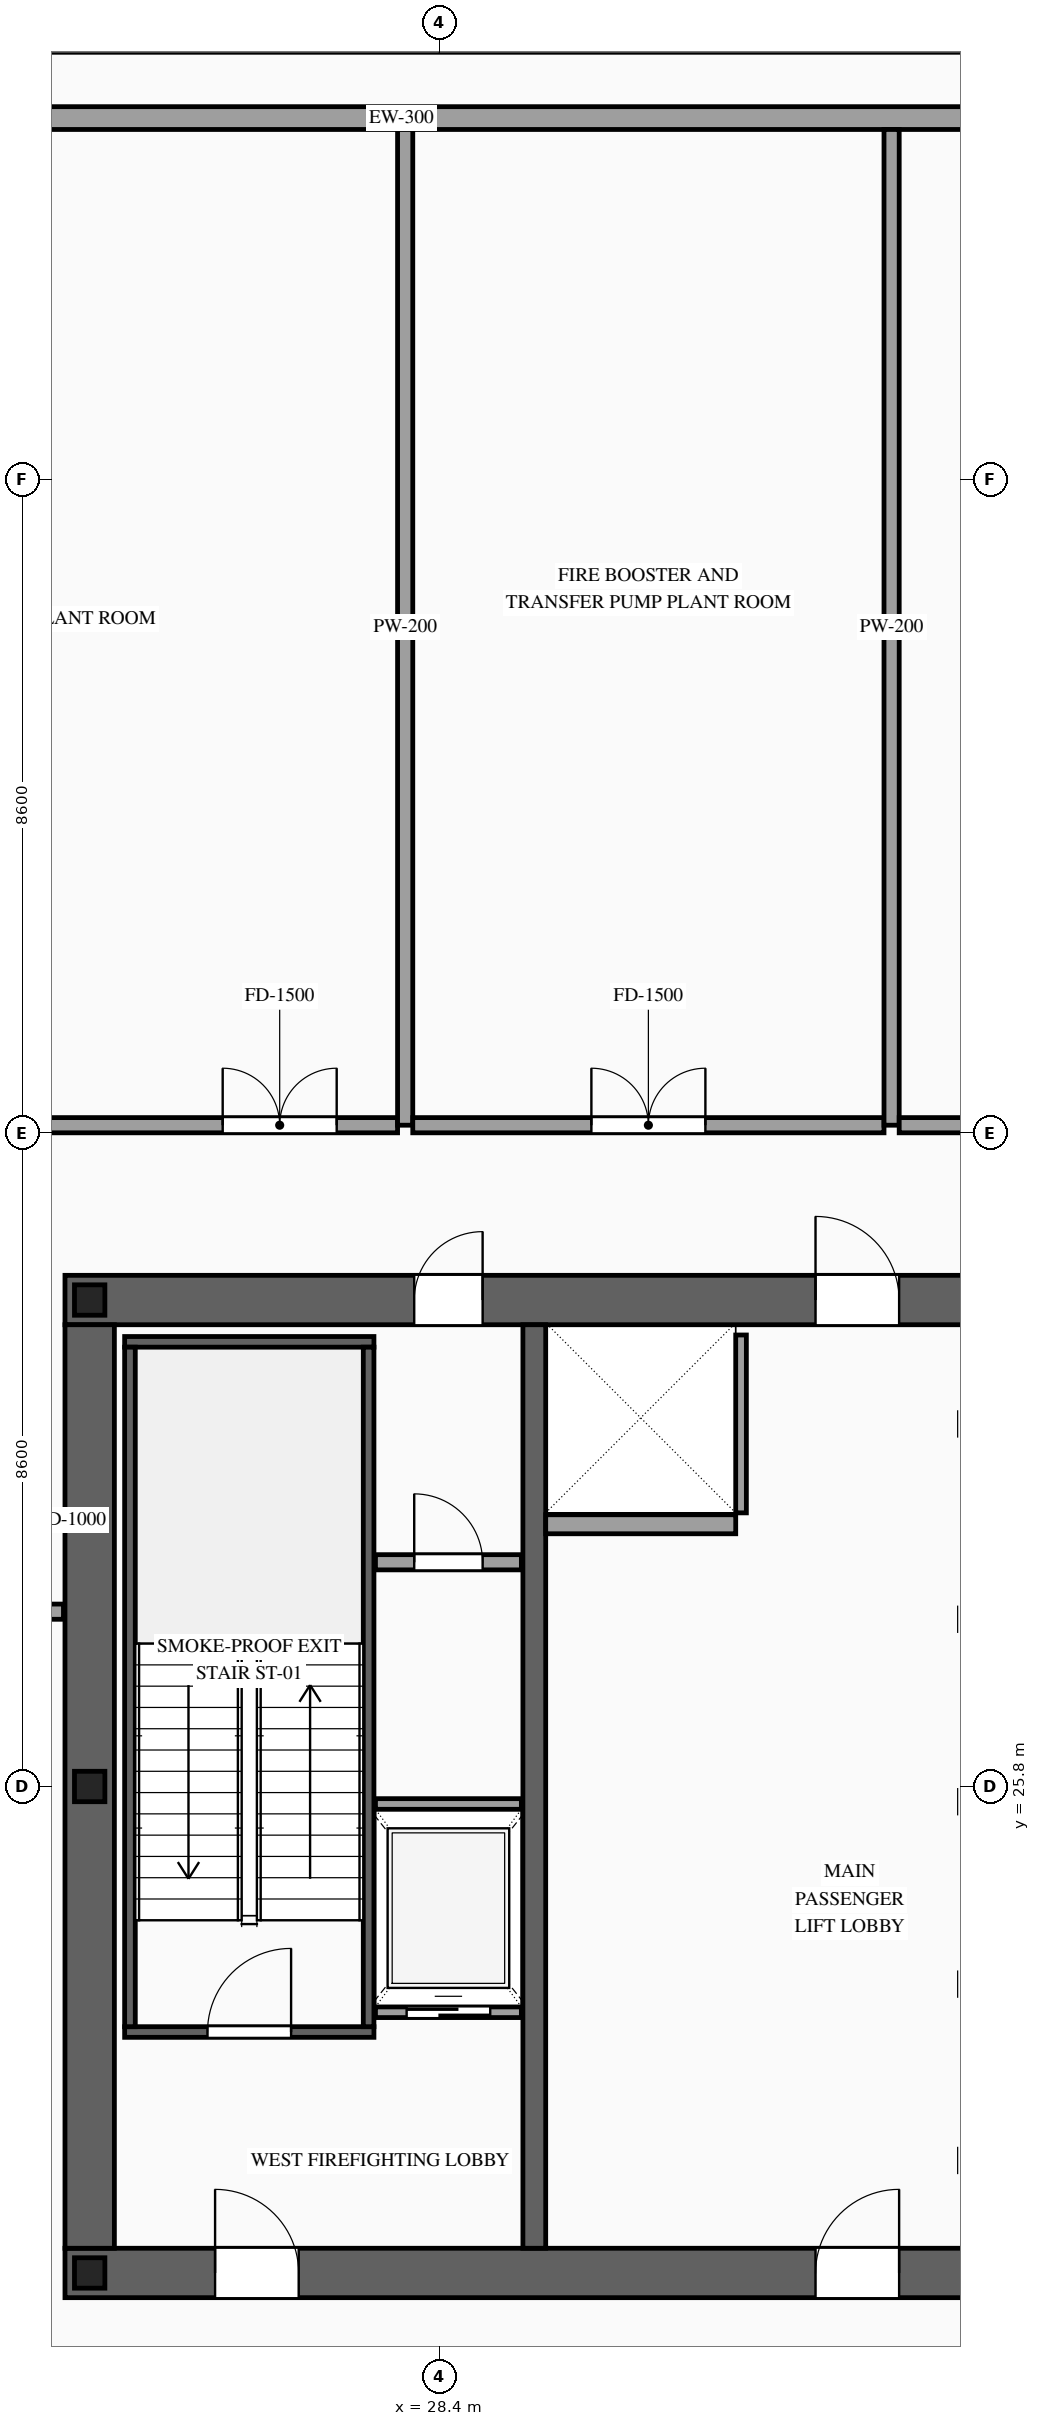
"""IFC4 building model, lengths in metres.
Left out: names, types, materials, properties, quantities, classifications, styles, units other than length and angle.
Written with IfcOpenShell. Run it as: python <this file> out.ifc"""

import sys

from ifc_helpers import new_model, si_unit, direction, frame, frame_2d, origin, origin_2d, place, context, subcontext, project, spatial, rectangle, i_section, extrude, source, transform, mapped, element, fill, save


model = new_model("IFC4")
c1 = context("Model", 3, precision=1e-05, world=origin(), true_north=direction((0.0, 1.0)))
c2 = subcontext(c1, "Body", "Model", "MODEL_VIEW")
j1 = project(units=[si_unit("LENGTHUNIT", "METRE"), si_unit("PLANEANGLEUNIT", "RADIAN")], contexts=[c1])
p1 = place(None, origin())
s1 = spatial("IfcSite", under=j1, at=p1, CompositionType="ELEMENT")
p2 = place(p1, origin())
s2 = spatial("IfcBuilding", under=s1, at=p2, CompositionType="ELEMENT")
p3 = place(p2, frame((0.0, 0.0, 176.4)))
s3 = spatial("IfcBuildingStorey", under=s2, at=p3, CompositionType="ELEMENT", Elevation=176.4)
p4 = place(p3, frame((23.475, 19.4, 0.0), z_axis=(0.0, 0.0, 1.0), x_axis=(1.0, 0.0, 0.0)))
e1 = element("IfcWall", 1, at=p4, inside=s3, PredefinedType="SHEAR", context=c2, shape_type="SweptSolid", body=[
    extrude(rectangle(XDim=27.05, YDim=0.65, at=frame_2d((13.525, 0.0))), origin(), (0.0, 0.0, 1.0), 4.6),
])
p5 = place(p4, frame((1.975, 0.0, 0.0)))
e2 = element("IfcOpeningElement", 2, at=p5, cuts=e1, PredefinedType="OPENING", context=c2, shape_type="SweptSolid", body=[
    extrude(rectangle(XDim=1.1, YDim=2.2, at=frame_2d((0.55, 1.1))), frame((0.0, 0.34, 0.0), z_axis=(0.0, -1.0, 0.0), x_axis=(1.0, 0.0, 0.0)), (0.0, 0.0, 1.0), 0.68),
])
p6 = place(p4, frame((9.875, 0.0, 0.0)))
e3 = element("IfcOpeningElement", 3, at=p6, cuts=e1, PredefinedType="OPENING", context=c2, shape_type="SweptSolid", body=[
    extrude(rectangle(XDim=1.1, YDim=2.2, at=frame_2d((0.55, 1.1))), frame((0.0, 0.34, 0.0), z_axis=(0.0, -1.0, 0.0), x_axis=(1.0, 0.0, 0.0)), (0.0, 0.0, 1.0), 0.68),
])
p7 = place(p4, frame((23.075, 0.0, 0.0)))
e4 = element("IfcOpeningElement", 4, at=p7, cuts=e1, PredefinedType="OPENING", context=c2, shape_type="SweptSolid", body=[
    extrude(rectangle(XDim=1.1, YDim=2.2, at=frame_2d((0.55, 1.1))), frame((0.0, 0.34, 0.0), z_axis=(0.0, -1.0, 0.0), x_axis=(1.0, 0.0, 0.0)), (0.0, 0.0, 1.0), 0.68),
])
p8 = place(p4, frame((19.695, 0.0, 0.0)))
e5 = element("IfcOpeningElement", 5, at=p8, cuts=e1, PredefinedType="OPENING", context=c2, shape_type="SweptSolid", body=[
    extrude(rectangle(XDim=0.9, YDim=2.15, at=frame_2d((0.45, 1.075))), frame((0.0, 0.34, 0.0), z_axis=(0.0, -1.0, 0.0), x_axis=(1.0, 0.0, 0.0)), (0.0, 0.0, 1.0), 0.68),
])
p9 = place(p3, frame((23.475, 32.2, 0.0), z_axis=(0.0, 0.0, 1.0), x_axis=(1.0, 0.0, 0.0)))
e6 = element("IfcWall", 6, at=p9, inside=s3, PredefinedType="SHEAR", context=c2, shape_type="SweptSolid", body=[
    extrude(rectangle(XDim=27.05, YDim=0.65, at=frame_2d((13.525, 0.0))), origin(), (0.0, 0.0, 1.0), 4.6),
])
p10 = place(p9, frame((4.595, 0.0, 0.0)))
e7 = element("IfcOpeningElement", 7, at=p10, cuts=e6, PredefinedType="OPENING", context=c2, shape_type="SweptSolid", body=[
    extrude(rectangle(XDim=0.9, YDim=2.15, at=frame_2d((0.45, 1.075))), frame((0.0, 0.34, 0.0), z_axis=(0.0, -1.0, 0.0), x_axis=(1.0, 0.0, 0.0)), (0.0, 0.0, 1.0), 0.68),
])
p11 = place(p9, frame((9.875, 0.0, 0.0)))
e8 = element("IfcOpeningElement", 8, at=p11, cuts=e6, PredefinedType="OPENING", context=c2, shape_type="SweptSolid", body=[
    extrude(rectangle(XDim=1.1, YDim=2.2, at=frame_2d((0.55, 1.1))), frame((0.0, 0.34, 0.0), z_axis=(0.0, -1.0, 0.0), x_axis=(1.0, 0.0, 0.0)), (0.0, 0.0, 1.0), 0.68),
])
p12 = place(p9, frame((15.725, 0.0, 0.0)))
e9 = element("IfcOpeningElement", 9, at=p12, cuts=e6, PredefinedType="OPENING", context=c2, shape_type="SweptSolid", body=[
    extrude(rectangle(XDim=1.1, YDim=2.2, at=frame_2d((0.55, 1.1))), frame((0.0, 0.34, 0.0), z_axis=(0.0, -1.0, 0.0), x_axis=(1.0, 0.0, 0.0)), (0.0, 0.0, 1.0), 0.68),
])
p13 = place(p9, frame((18.925, 0.0, 0.0)))
e10 = element("IfcOpeningElement", 10, at=p13, cuts=e6, PredefinedType="OPENING", context=c2, shape_type="SweptSolid", body=[
    extrude(rectangle(XDim=0.9, YDim=2.15, at=frame_2d((0.45, 1.075))), frame((0.0, 0.34, 0.0), z_axis=(0.0, -1.0, 0.0), x_axis=(1.0, 0.0, 0.0)), (0.0, 0.0, 1.0), 0.68),
])
m1 = source(origin(), c2, "Body", "SweptSolid", [
    extrude(rectangle(XDim=12.15, YDim=0.65, at=frame_2d((6.075, 0.0))), origin(), (0.0, 0.0, 1.0), 4.6),
])
p14 = place(p3, frame((23.8, 19.725, 0.0), z_axis=(0.0, 0.0, 1.0), x_axis=(0.0, 1.0, 0.0)))
e11 = element("IfcWall", 11, at=p14, inside=s3, PredefinedType="SHEAR", context=c2, shape_type="MappedRepresentation", body=[
    mapped(m1, transform((0.0, 0.0, 0.0), scale=1.0)),
])
m2 = source(origin(), c2, "Body", "SweptSolid", [
    extrude(rectangle(XDim=12.15, YDim=0.3, at=frame_2d((6.075, 0.0))), origin(), (0.0, 0.0, 1.0), 4.6),
])
p15 = place(p3, frame((29.65, 19.725, 0.0), z_axis=(0.0, 0.0, 1.0), x_axis=(0.0, 1.0, 0.0)))
e12 = element("IfcWall", 12, at=p15, inside=s3, PredefinedType="SOLIDWALL", context=c2, shape_type="MappedRepresentation", body=[
    mapped(m2, transform((0.0, 0.0, 0.0), scale=1.0)),
])
m3 = source(origin(), c2, "Body", "SweptSolid", [
    extrude(i_section(OverallWidth=0.4, OverallDepth=0.4, WebThickness=0.013, FlangeThickness=0.021, at=origin_2d()), origin(), (0.0, 0.0, 1.0), 4.6),
])
for number, where, z_axis, x_axis in (
    (13, (23.8, 19.4, 0.0), (0.0, 0.0, 1.0), (1.0, 0.0, 0.0)),
    (14, (23.8, 25.8, 0.0), (0.0, 0.0, 1.0), (1.0, 0.0, 0.0)),
    (15, (23.8, 32.2, 0.0), (0.0, 0.0, 1.0), (1.0, 0.0, 0.0)),
):
    element("IfcColumn", number, at=place(p3, frame(where, z_axis=z_axis, x_axis=x_axis)), inside=s3, PredefinedType="COLUMN", context=c2, shape_type="MappedRepresentation", body=[
        mapped(m3, transform((0.0, 0.0, 0.0), scale=1.0)),
    ])
m4 = source(origin(), c2, "Body", "SweptSolid", [
    extrude(rectangle(XDim=17.4, YDim=0.3, at=frame_2d((8.7, 0.0))), origin(), (0.0, 0.0, 1.0), 3.935),
])
p16 = place(p3, frame((19.2, 47.75, 0.0), z_axis=(0.0, 0.0, 1.0), x_axis=(1.0, 0.0, 0.0)))
e16 = element("IfcWall", 16, at=p16, inside=s3, PredefinedType="SOLIDWALL", context=c2, shape_type="MappedRepresentation", body=[
    mapped(m4, transform((0.0, 0.0, 0.0), scale=1.0)),
])
p17 = place(p3, frame((27.56, 22.83, 0.0), z_axis=(0.0, 0.0, 1.0), x_axis=(1.0, 0.0, 0.0)))
e17 = element("IfcWall", 17, at=p17, inside=s3, PredefinedType="SOLIDWALL", context=c2, shape_type="SweptSolid", body=[
    extrude(rectangle(XDim=1.92, YDim=0.14, at=frame_2d((0.96, 0.0))), origin(), (0.0, 0.0, 1.0), 4.38),
])
p18 = place(p17, frame((0.41, 0.0, 0.0)))
e18 = element("IfcOpeningElement", 18, at=p18, cuts=e17, PredefinedType="OPENING", context=c2, shape_type="SweptSolid", body=[
    extrude(rectangle(XDim=1.1, YDim=2.2, at=frame_2d((0.55, 1.1))), frame((0.0, 0.085, 0.0), z_axis=(0.0, -1.0, 0.0), x_axis=(1.0, 0.0, 0.0)), (0.0, 0.0, 1.0), 0.17),
])
m5 = source(origin(), c2, "Body", "SweptSolid", [
    extrude(rectangle(XDim=1.92, YDim=0.14, at=frame_2d((0.96, 0.0))), origin(), (0.0, 0.0, 1.0), 4.38),
])
p19 = place(p3, frame((27.56, 25.57, 0.0), z_axis=(0.0, 0.0, 1.0), x_axis=(1.0, 0.0, 0.0)))
e19 = element("IfcWall", 19, at=p19, inside=s3, PredefinedType="SOLIDWALL", context=c2, shape_type="MappedRepresentation", body=[
    mapped(m5, transform((0.0, 0.0, 0.0), scale=1.0)),
])
m6 = source(origin(), c2, "Body", "SweptSolid", [
    extrude(rectangle(XDim=2.34, YDim=0.14, at=frame_2d((1.17, 0.0))), origin(), (0.0, 0.0, 1.0), 4.38),
])
p20 = place(p3, frame((32.37, 29.4, 0.0), z_axis=(0.0, 0.0, 1.0), x_axis=(0.0, 1.0, 0.0)))
e20 = element("IfcWall", 20, at=p20, inside=s3, PredefinedType="SOLIDWALL", context=c2, shape_type="MappedRepresentation", body=[
    mapped(m6, transform((0.0, 0.0, 0.0), scale=1.0)),
])
m7 = source(origin(), c2, "Body", "SweptSolid", [
    extrude(rectangle(XDim=2.5, YDim=0.25, at=frame_2d((1.25, 0.0))), origin(), (0.0, 0.0, 1.0), 4.38),
])
p21 = place(p3, frame((29.8, 29.25, 0.0), z_axis=(0.0, 0.0, 1.0), x_axis=(1.0, 0.0, 0.0)))
e21 = element("IfcWall", 21, at=p21, inside=s3, PredefinedType="SOLIDWALL", context=c2, shape_type="MappedRepresentation", body=[
    mapped(m7, transform((0.0, 0.0, 0.0), scale=1.0)),
])
p22 = place(p3, frame((24.26, 22.57, 0.0), z_axis=(0.0, 0.0, 1.0), x_axis=(1.0, 0.0, 0.0)))
e22 = element("IfcWall", 22, at=p22, inside=s3, PredefinedType="SOLIDWALL", context=c2, shape_type="SweptSolid", body=[
    extrude(rectangle(XDim=3.28, YDim=0.14, at=frame_2d((1.64, 0.0))), origin(), (0.0, 0.0, 1.0), 4.38),
])
p23 = place(p22, frame((1.09, 0.0, 0.0)))
e23 = element("IfcOpeningElement", 23, at=p23, cuts=e22, PredefinedType="OPENING", context=c2, shape_type="SweptSolid", body=[
    extrude(rectangle(XDim=1.1, YDim=2.2, at=frame_2d((0.55, 1.1))), frame((0.0, 0.085, 0.0), z_axis=(0.0, -1.0, 0.0), x_axis=(1.0, 0.0, 0.0)), (0.0, 0.0, 1.0), 0.17),
])
m8 = source(origin(), c2, "Body", "SweptSolid", [
    extrude(rectangle(XDim=3.28, YDim=0.14, at=frame_2d((1.64, 0.0))), origin(), (0.0, 0.0, 1.0), 4.38),
])
p24 = place(p3, frame((24.26, 31.65, 0.0), z_axis=(0.0, 0.0, 1.0), x_axis=(1.0, 0.0, 0.0)))
e24 = element("IfcWall", 24, at=p24, inside=s3, PredefinedType="SOLIDWALL", context=c2, shape_type="MappedRepresentation", body=[
    mapped(m8, transform((0.0, 0.0, 0.0), scale=1.0)),
])
m9 = source(origin(), c2, "Body", "SweptSolid", [
    extrude(rectangle(XDim=8.94, YDim=0.14, at=frame_2d((4.47, 0.0))), origin(), (0.0, 0.0, 1.0), 4.38),
])
for number, where, z_axis, x_axis in (
    (25, (24.33, 22.64, 0.0), (0.0, 0.0, 1.0), (0.0, 1.0, 0.0)),
    (26, (27.47, 22.64, 0.0), (0.0, 0.0, 1.0), (0.0, 1.0, 0.0)),
):
    element("IfcWall", number, at=place(p3, frame(where, z_axis=z_axis, x_axis=x_axis)), inside=s3, PredefinedType="SOLIDWALL", context=c2, shape_type="MappedRepresentation", body=[
        mapped(m9, transform((0.0, 0.0, 0.0), scale=1.0)),
    ])
p25 = place(p3, frame((27.56, 28.75, 0.0), z_axis=(0.0, 0.0, 1.0), x_axis=(1.0, 0.0, 0.0)))
e27 = element("IfcWall", 27, at=p25, inside=s3, PredefinedType="PARTITIONING", context=c2, shape_type="SweptSolid", body=[
    extrude(rectangle(XDim=1.92, YDim=0.2, at=frame_2d((0.96, 0.0))), origin(), (0.0, 0.0, 1.0), 4.38),
])
p26 = place(p25, frame((0.51, 0.0, 0.0)))
e28 = element("IfcOpeningElement", 28, at=p26, cuts=e27, PredefinedType="OPENING", context=c2, shape_type="SweptSolid", body=[
    extrude(rectangle(XDim=0.9, YDim=2.15, at=frame_2d((0.45, 1.075))), frame((0.0, 0.115, 0.0), z_axis=(0.0, -1.0, 0.0), x_axis=(1.0, 0.0, 0.0)), (0.0, 0.0, 1.0), 0.23),
])
m10 = source(origin(), c2, "Body", "SweptSolid", [
    extrude(rectangle(XDim=1.505, YDim=0.2, at=frame_2d((0.752, 0.0))), origin(), (0.0, 0.0, 1.0), 4.38),
])
p27 = place(p3, frame((21.95, 28.1, 0.0), z_axis=(0.0, 0.0, 1.0), x_axis=(1.0, 0.0, 0.0)))
e29 = element("IfcWall", 29, at=p27, inside=s3, PredefinedType="PARTITIONING", context=c2, shape_type="MappedRepresentation", body=[
    mapped(m10, transform((0.0, 0.0, 0.0), scale=1.0)),
])
p28 = place(p3, frame((17.94, 34.5, 0.0), z_axis=(0.0, 0.0, 1.0), x_axis=(1.0, 0.0, 0.0)))
e30 = element("IfcWall", 30, at=p28, inside=s3, PredefinedType="PARTITIONING", context=c2, shape_type="SweptSolid", body=[
    extrude(rectangle(XDim=9.911, YDim=0.2, at=frame_2d((4.956, 0.0))), origin(), (0.0, 0.0, 1.0), 4.38),
])
p29 = place(p28, frame((7.61, 0.0, 0.0)))
e31 = element("IfcOpeningElement", 31, at=p29, cuts=e30, PredefinedType="OPENING", context=c2, shape_type="SweptSolid", body=[
    extrude(rectangle(XDim=1.5, YDim=2.3, at=frame_2d((0.75, 1.15))), frame((0.0, 0.115, 0.0), z_axis=(0.0, -1.0, 0.0), x_axis=(1.0, 0.0, 0.0)), (0.0, 0.0, 1.0), 0.23),
])
m11 = source(origin(), c2, "Body", "SweptSolid", [
    extrude(rectangle(XDim=13.1, YDim=0.2, at=frame_2d((6.55, 0.0))), origin(), (0.0, 0.0, 1.0), 4.38),
])
p30 = place(p3, frame((27.951, 34.5, 0.0), z_axis=(0.0, 0.0, 1.0), x_axis=(0.0, 1.0, 0.0)))
e32 = element("IfcWall", 32, at=p30, inside=s3, PredefinedType="PARTITIONING", context=c2, shape_type="MappedRepresentation", body=[
    mapped(m11, transform((0.0, 0.0, 0.0), scale=1.0)),
])
p31 = place(p3, frame((28.051, 34.5, 0.0), z_axis=(0.0, 0.0, 1.0), x_axis=(1.0, 0.0, 0.0)))
e33 = element("IfcWall", 33, at=p31, inside=s3, PredefinedType="PARTITIONING", context=c2, shape_type="SweptSolid", body=[
    extrude(rectangle(XDim=6.2, YDim=0.2, at=frame_2d((3.1, 0.0))), origin(), (0.0, 0.0, 1.0), 4.38),
])
p32 = place(p31, frame((2.35, 0.0, 0.0)))
e34 = element("IfcOpeningElement", 34, at=p32, cuts=e33, PredefinedType="OPENING", context=c2, shape_type="SweptSolid", body=[
    extrude(rectangle(XDim=1.5, YDim=2.3, at=frame_2d((0.75, 1.15))), frame((0.0, 0.115, 0.0), z_axis=(0.0, -1.0, 0.0), x_axis=(1.0, 0.0, 0.0)), (0.0, 0.0, 1.0), 0.23),
])
p33 = place(p3, frame((34.351, 34.5, 0.0), z_axis=(0.0, 0.0, 1.0), x_axis=(0.0, 1.0, 0.0)))
e35 = element("IfcWall", 35, at=p33, inside=s3, PredefinedType="PARTITIONING", context=c2, shape_type="MappedRepresentation", body=[
    mapped(m11, transform((0.0, 0.0, 0.0), scale=1.0)),
])
p34 = place(p3, frame((34.451, 34.5, 0.0), z_axis=(0.0, 0.0, 1.0), x_axis=(1.0, 0.0, 0.0)))
e36 = element("IfcWall", 36, at=p34, inside=s3, PredefinedType="PARTITIONING", context=c2, shape_type="SweptSolid", body=[
    extrude(rectangle(XDim=6.2, YDim=0.2, at=frame_2d((3.1, 0.0))), origin(), (0.0, 0.0, 1.0), 4.38),
])
p35 = place(p34, frame((2.35, 0.0, 0.0)))
e37 = element("IfcOpeningElement", 37, at=p35, cuts=e36, PredefinedType="OPENING", context=c2, shape_type="SweptSolid", body=[
    extrude(rectangle(XDim=1.5, YDim=2.3, at=frame_2d((0.75, 1.15))), frame((0.0, 0.115, 0.0), z_axis=(0.0, -1.0, 0.0), x_axis=(1.0, 0.0, 0.0)), (0.0, 0.0, 1.0), 0.23),
])
m12 = source(origin(), c2, "Body", "SweptSolid", [
    extrude(rectangle(XDim=1.1, YDim=2.2, at=frame_2d((0.55, 1.1))), frame((0.0, 0.025, 0.0), z_axis=(0.0, -1.0, 0.0), x_axis=(1.0, 0.0, 0.0)), (0.0, 0.0, 1.0), 0.05),
])
p36 = place(p18, origin())
e38 = element("IfcDoor", 38, at=p36, inside=s3, OperationType="SLIDING_TO_LEFT", PredefinedType="DOOR", context=c2, shape_type="MappedRepresentation", body=[
    mapped(m12, transform((0.0, 0.0, 0.0), scale=1.0)),
])
fill(e18, e38)
m13 = source(origin(), c2, "Body", "SweptSolid", [
    extrude(rectangle(XDim=1.1, YDim=2.2, at=frame_2d((0.55, 1.1))), frame((0.0, 0.025, 0.0), z_axis=(0.0, -1.0, 0.0), x_axis=(1.0, 0.0, 0.0)), (0.0, 0.0, 1.0), 0.05),
])
p37 = place(p23, origin())
e39 = element("IfcDoor", 39, at=p37, inside=s3, OperationType="SINGLE_SWING_RIGHT", PredefinedType="DOOR", context=c2, shape_type="MappedRepresentation", body=[
    mapped(m13, transform((0.0, 0.0, 0.0), scale=1.0)),
])
fill(e23, e39)
p38 = place(p5, origin())
e40 = element("IfcDoor", 40, at=p38, inside=s3, OperationType="SINGLE_SWING_LEFT", PredefinedType="DOOR", context=c2, shape_type="MappedRepresentation", body=[
    mapped(m13, transform((0.0, 0.0, 0.0), scale=1.0)),
])
fill(e2, e40)
p39 = place(p6, origin())
e41 = element("IfcDoor", 41, at=p39, inside=s3, OperationType="SINGLE_SWING_RIGHT", PredefinedType="DOOR", context=c2, shape_type="MappedRepresentation", body=[
    mapped(m13, transform((0.0, 0.0, 0.0), scale=1.0)),
])
fill(e3, e41)
m14 = source(origin(), c2, "Body", "SweptSolid", [
    extrude(rectangle(XDim=0.9, YDim=2.15, at=frame_2d((0.45, 1.075))), frame((0.0, 0.025, 0.0), z_axis=(0.0, -1.0, 0.0), x_axis=(1.0, 0.0, 0.0)), (0.0, 0.0, 1.0), 0.05),
])
p40 = place(p10, origin())
e42 = element("IfcDoor", 42, at=p40, inside=s3, OperationType="SINGLE_SWING_RIGHT", PredefinedType="DOOR", context=c2, shape_type="MappedRepresentation", body=[
    mapped(m14, transform((0.0, 0.0, 0.0), scale=1.0)),
])
fill(e7, e42)
p41 = place(p11, origin())
e43 = element("IfcDoor", 43, at=p41, inside=s3, OperationType="SINGLE_SWING_LEFT", PredefinedType="DOOR", context=c2, shape_type="MappedRepresentation", body=[
    mapped(m13, transform((0.0, 0.0, 0.0), scale=1.0)),
])
fill(e8, e43)
p42 = place(p26, origin())
e44 = element("IfcDoor", 44, at=p42, inside=s3, OperationType="SINGLE_SWING_LEFT", PredefinedType="DOOR", context=c2, shape_type="MappedRepresentation", body=[
    mapped(m14, transform((0.0, 0.0, 0.0), scale=1.0)),
])
fill(e28, e44)
m15 = source(origin(), c2, "Body", "SweptSolid", [
    extrude(rectangle(XDim=1.5, YDim=2.3, at=frame_2d((0.75, 1.15))), frame((0.0, 0.025, 0.0), z_axis=(0.0, -1.0, 0.0), x_axis=(1.0, 0.0, 0.0)), (0.0, 0.0, 1.0), 0.05),
])
p43 = place(p29, origin())
e45 = element("IfcDoor", 45, at=p43, inside=s3, OperationType="DOUBLE_DOOR_SINGLE_SWING", PredefinedType="DOOR", context=c2, shape_type="MappedRepresentation", body=[
    mapped(m15, transform((0.0, 0.0, 0.0), scale=1.0)),
])
fill(e31, e45)
p44 = place(p32, origin())
e46 = element("IfcDoor", 46, at=p44, inside=s3, OperationType="DOUBLE_DOOR_SINGLE_SWING", PredefinedType="DOOR", context=c2, shape_type="MappedRepresentation", body=[
    mapped(m15, transform((0.0, 0.0, 0.0), scale=1.0)),
])
fill(e34, e46)
save(model, sys.argv[1])
